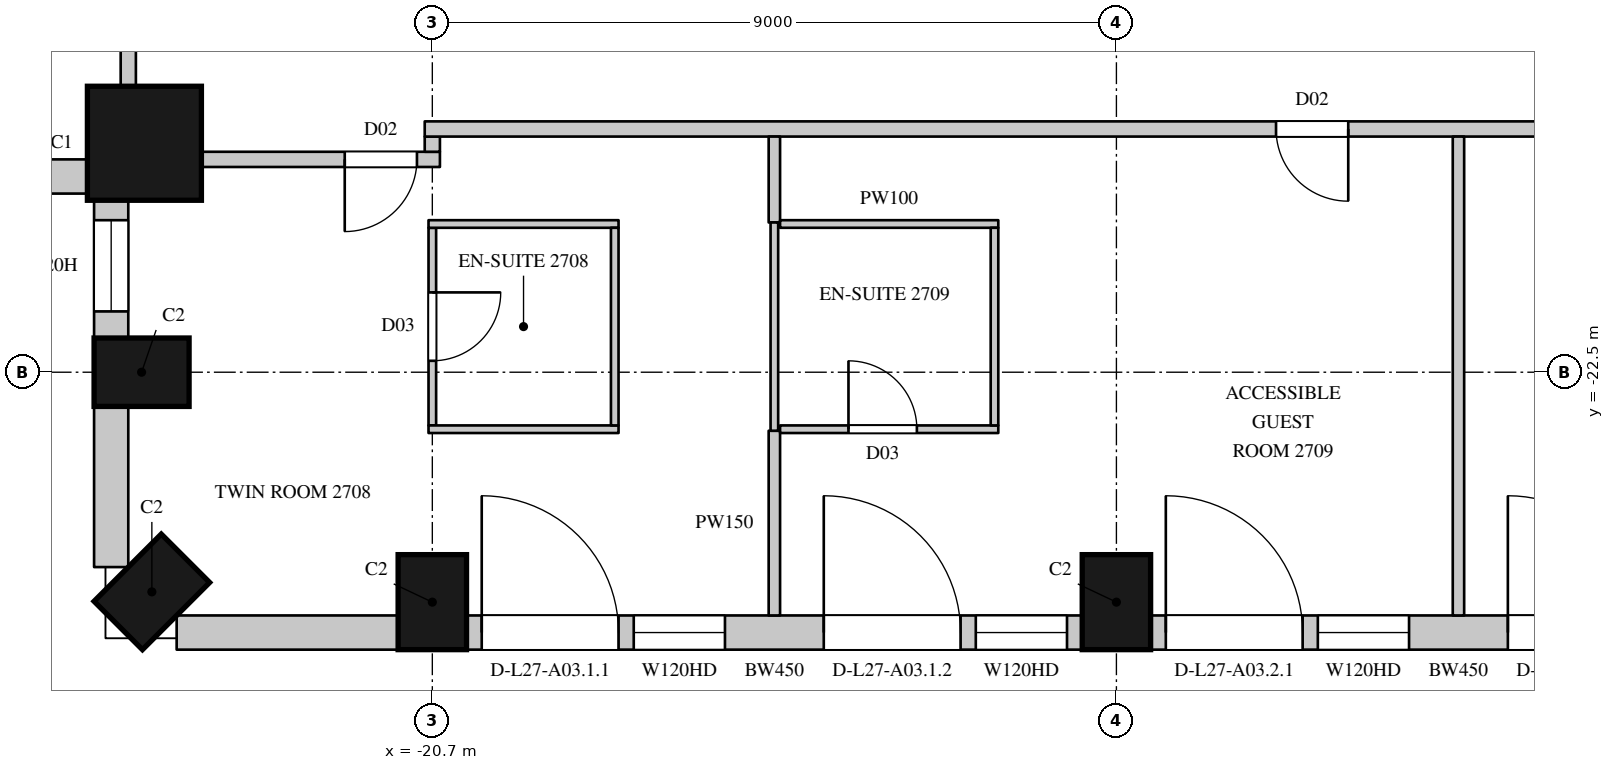
"""IFC4 building model, lengths in metres.
Left out: names, types, materials, properties, quantities, classifications, styles, units other than length and angle.
Written with IfcOpenShell. Run it as: python <this file> out.ifc"""

import sys

from ifc_helpers import new_model, si_unit, direction, frame, frame_2d, origin, origin_2d, place, context, subcontext, project, spatial, rectangle, circle, extrude, element, fill, save


model = new_model("IFC4")
c1 = context("Model", 3, precision=1e-05, world=origin(), true_north=direction((0.0, 1.0)))
c2 = subcontext(c1, "Body", "Model", "MODEL_VIEW")
j1 = project(units=[si_unit("LENGTHUNIT", "METRE"), si_unit("PLANEANGLEUNIT", "RADIAN")], contexts=[c1])
p1 = place(None, origin())
s1 = spatial("IfcSite", under=j1, at=p1, CompositionType="ELEMENT")
p2 = place(p1, origin())
s2 = spatial("IfcBuilding", under=s1, at=p2, CompositionType="ELEMENT")
p3 = place(p2, frame((0.0, 0.0, 127.5)))
s3 = spatial("IfcBuildingStorey", under=s2, at=p3, CompositionType="ELEMENT", Elevation=127.5)
p4 = place(p3, frame((-24.488, -19.488, 0.0), z_axis=(0.0, 0.0, 1.0), x_axis=(1.0, 0.0, 0.0)))
e1 = element("IfcColumn", 1, at=p4, inside=s3, PredefinedType="COLUMN", context=c2, shape_type="SweptSolid", body=[
    extrude(circle(Radius=0.75, at=origin_2d()), origin(), (0.0, 0.0, 1.0), 3.6),
])
for number, where, z_axis, x_axis in (
    (2, (-24.525, -22.5, 0.0), (0.0, 0.0, 1.0), (0.0, -1.0, 0.0)),
    (3, (-24.39, -25.39, 0.0), (0.0, 0.0, 1.0), (0.707, -0.707, 0.0)),
    (4, (-20.7, -25.525, 0.0), (0.0, 0.0, 1.0), (1.0, 0.0, 0.0)),
    (5, (-11.7, -25.525, 0.0), (0.0, 0.0, 1.0), (1.0, 0.0, 0.0)),
):
    element("IfcColumn", number, at=place(p3, frame(where, z_axis=z_axis, x_axis=x_axis)), inside=s3, PredefinedType="COLUMN", context=c2, shape_type="SweptSolid", body=[
        extrude(rectangle(XDim=0.9, YDim=1.25, at=origin_2d()), origin(), (0.0, 0.0, 1.0), 3.6),
    ])
p5 = place(p3, frame((-29.064, -19.925, 0.0), z_axis=(0.0, 0.0, 1.0), x_axis=(1.0, 0.0, 0.0)))
e6 = element("IfcWall", 6, at=p5, inside=s3, PredefinedType="SOLIDWALL", context=c2, shape_type="SweptSolid", body=[
    extrude(rectangle(XDim=3.857, YDim=0.45, at=frame_2d((1.928, 0.0))), origin(), (0.0, 0.0, 1.0), 3.3),
])
p6 = place(p5, frame((0.514, 0.0, 1.05)))
e7 = element("IfcOpeningElement", 7, at=p6, cuts=e6, PredefinedType="OPENING", context=c2, shape_type="SweptSolid", body=[
    extrude(rectangle(XDim=2.7, YDim=2.0, at=frame_2d((1.35, 1.0))), frame((0.0, 0.235, 0.0), z_axis=(0.0, -1.0, 0.0), x_axis=(1.0, 0.0, 0.0)), (0.0, 0.0, 1.0), 0.47),
])
p7 = place(p3, frame((-24.925, -20.207, 0.0), z_axis=(0.0, 0.0, 1.0), x_axis=(0.0, -1.0, 0.0)))
e8 = element("IfcWall", 8, at=p7, inside=s3, PredefinedType="SOLIDWALL", context=c2, shape_type="SweptSolid", body=[
    extrude(rectangle(XDim=1.843, YDim=0.45, at=frame_2d((0.921, 0.0))), origin(), (0.0, 0.0, 1.0), 3.3),
])
p8 = place(p7, frame((0.293, 0.0, 1.05)))
e9 = element("IfcOpeningElement", 9, at=p8, cuts=e8, PredefinedType="OPENING", context=c2, shape_type="SweptSolid", body=[
    extrude(rectangle(XDim=1.2, YDim=2.0, at=frame_2d((0.6, 1.0))), frame((0.0, 0.235, 0.0), z_axis=(0.0, -1.0, 0.0), x_axis=(1.0, 0.0, 0.0)), (0.0, 0.0, 1.0), 0.47),
])
p9 = place(p3, frame((-24.925, -22.95, 0.0), z_axis=(0.0, 0.0, 1.0), x_axis=(0.0, -1.0, 0.0)))
e10 = element("IfcWall", 10, at=p9, inside=s3, PredefinedType="SOLIDWALL", context=c2, shape_type="SweptSolid", body=[
    extrude(rectangle(XDim=2.114, YDim=0.45, at=frame_2d((1.057, 0.0))), origin(), (0.0, 0.0, 1.0), 3.3),
])
p10 = place(p3, frame((-24.064, -25.925, 0.0), z_axis=(0.0, 0.0, 1.0), x_axis=(1.0, 0.0, 0.0)))
e11 = element("IfcWall", 11, at=p10, inside=s3, PredefinedType="SOLIDWALL", context=c2, shape_type="SweptSolid", body=[
    extrude(rectangle(XDim=2.914, YDim=0.45, at=frame_2d((1.457, 0.0))), origin(), (0.0, 0.0, 1.0), 3.3),
])
p11 = place(p3, frame((-20.25, -25.925, 0.0), z_axis=(0.0, 0.0, 1.0), x_axis=(1.0, 0.0, 0.0)))
e12 = element("IfcWall", 12, at=p11, inside=s3, PredefinedType="SOLIDWALL", context=c2, shape_type="SweptSolid", body=[
    extrude(rectangle(XDim=8.1, YDim=0.45, at=frame_2d((4.05, 0.0))), origin(), (0.0, 0.0, 1.0), 3.3),
])
p12 = place(p11, frame((0.2, 0.0, 0.0)))
e13 = element("IfcOpeningElement", 13, at=p12, cuts=e12, PredefinedType="OPENING", context=c2, shape_type="SweptSolid", body=[
    extrude(rectangle(XDim=1.8, YDim=2.4, at=frame_2d((0.9, 1.2))), frame((0.0, 0.235, 0.0), z_axis=(0.0, -1.0, 0.0), x_axis=(1.0, 0.0, 0.0)), (0.0, 0.0, 1.0), 0.47),
])
p13 = place(p11, frame((2.2, 0.0, 1.05)))
e14 = element("IfcOpeningElement", 14, at=p13, cuts=e12, PredefinedType="OPENING", context=c2, shape_type="SweptSolid", body=[
    extrude(rectangle(XDim=1.2, YDim=2.0, at=frame_2d((0.6, 1.0))), frame((0.0, 0.235, 0.0), z_axis=(0.0, -1.0, 0.0), x_axis=(1.0, 0.0, 0.0)), (0.0, 0.0, 1.0), 0.47),
])
p14 = place(p11, frame((4.7, 0.0, 0.0)))
e15 = element("IfcOpeningElement", 15, at=p14, cuts=e12, PredefinedType="OPENING", context=c2, shape_type="SweptSolid", body=[
    extrude(rectangle(XDim=1.8, YDim=2.4, at=frame_2d((0.9, 1.2))), frame((0.0, 0.235, 0.0), z_axis=(0.0, -1.0, 0.0), x_axis=(1.0, 0.0, 0.0)), (0.0, 0.0, 1.0), 0.47),
])
p15 = place(p11, frame((6.7, 0.0, 1.05)))
e16 = element("IfcOpeningElement", 16, at=p15, cuts=e12, PredefinedType="OPENING", context=c2, shape_type="SweptSolid", body=[
    extrude(rectangle(XDim=1.2, YDim=2.0, at=frame_2d((0.6, 1.0))), frame((0.0, 0.235, 0.0), z_axis=(0.0, -1.0, 0.0), x_axis=(1.0, 0.0, 0.0)), (0.0, 0.0, 1.0), 0.47),
])
p16 = place(p3, frame((-11.25, -25.925, 0.0), z_axis=(0.0, 0.0, 1.0), x_axis=(1.0, 0.0, 0.0)))
e17 = element("IfcWall", 17, at=p16, inside=s3, PredefinedType="SOLIDWALL", context=c2, shape_type="SweptSolid", body=[
    extrude(rectangle(XDim=8.1, YDim=0.45, at=frame_2d((4.05, 0.0))), origin(), (0.0, 0.0, 1.0), 3.3),
])
p17 = place(p16, frame((0.2, 0.0, 0.0)))
e18 = element("IfcOpeningElement", 18, at=p17, cuts=e17, PredefinedType="OPENING", context=c2, shape_type="SweptSolid", body=[
    extrude(rectangle(XDim=1.8, YDim=2.4, at=frame_2d((0.9, 1.2))), frame((0.0, 0.235, 0.0), z_axis=(0.0, -1.0, 0.0), x_axis=(1.0, 0.0, 0.0)), (0.0, 0.0, 1.0), 0.47),
])
p18 = place(p16, frame((2.2, 0.0, 1.05)))
e19 = element("IfcOpeningElement", 19, at=p18, cuts=e17, PredefinedType="OPENING", context=c2, shape_type="SweptSolid", body=[
    extrude(rectangle(XDim=1.2, YDim=2.0, at=frame_2d((0.6, 1.0))), frame((0.0, 0.235, 0.0), z_axis=(0.0, -1.0, 0.0), x_axis=(1.0, 0.0, 0.0)), (0.0, 0.0, 1.0), 0.47),
])
p19 = place(p16, frame((4.7, 0.0, 0.0)))
e20 = element("IfcOpeningElement", 20, at=p19, cuts=e17, PredefinedType="OPENING", context=c2, shape_type="SweptSolid", body=[
    extrude(rectangle(XDim=1.8, YDim=2.4, at=frame_2d((0.9, 1.2))), frame((0.0, 0.235, 0.0), z_axis=(0.0, -1.0, 0.0), x_axis=(1.0, 0.0, 0.0)), (0.0, 0.0, 1.0), 0.47),
])
p20 = place(p16, frame((6.7, 0.0, 1.05)))
e21 = element("IfcOpeningElement", 21, at=p20, cuts=e17, PredefinedType="OPENING", context=c2, shape_type="SweptSolid", body=[
    extrude(rectangle(XDim=1.2, YDim=2.0, at=frame_2d((0.6, 1.0))), frame((0.0, 0.235, 0.0), z_axis=(0.0, -1.0, 0.0), x_axis=(1.0, 0.0, 0.0)), (0.0, 0.0, 1.0), 0.47),
])
p21 = place(p3, frame((-24.7, -18.752, 0.0), z_axis=(0.0, 0.0, 1.0), x_axis=(0.0, 1.0, 0.0)))
e22 = element("IfcWall", 22, at=p21, inside=s3, PredefinedType="PARTITIONING", context=c2, shape_type="SweptSolid", body=[
    extrude(rectangle(XDim=2.722, YDim=0.2, at=frame_2d((1.361, 0.0))), origin(), (0.0, 0.0, 1.0), 3.3),
])
p22 = place(p21, frame((0.65, 0.0, 0.0)))
e23 = element("IfcOpeningElement", 23, at=p22, cuts=e22, PredefinedType="OPENING", context=c2, shape_type="SweptSolid", body=[
    extrude(rectangle(XDim=1.6, YDim=2.4, at=frame_2d((0.8, 1.2))), frame((0.0, 0.11, 0.0), z_axis=(0.0, -1.0, 0.0), x_axis=(1.0, 0.0, 0.0)), (0.0, 0.0, 1.0), 0.22),
])
p23 = place(p3, frame((-23.752, -19.7, 0.0), z_axis=(0.0, 0.0, 1.0), x_axis=(1.0, 0.0, 0.0)))
e24 = element("IfcWall", 24, at=p23, inside=s3, PredefinedType="PARTITIONING", context=c2, shape_type="SweptSolid", body=[
    extrude(rectangle(XDim=3.152, YDim=0.2, at=frame_2d((1.576, 0.0))), origin(), (0.0, 0.0, 1.0), 3.3),
])
p24 = place(p23, frame((1.9, 0.0, 0.0)))
e25 = element("IfcOpeningElement", 25, at=p24, cuts=e24, PredefinedType="OPENING", context=c2, shape_type="SweptSolid", body=[
    extrude(rectangle(XDim=0.95, YDim=2.2, at=frame_2d((0.475, 1.1))), frame((0.0, 0.11, 0.0), z_axis=(0.0, -1.0, 0.0), x_axis=(1.0, 0.0, 0.0)), (0.0, 0.0, 1.0), 0.22),
])
p25 = place(p3, frame((-20.7, -19.6, 0.0), z_axis=(0.0, 0.0, 1.0), x_axis=(0.0, 1.0, 0.0)))
e26 = element("IfcWall", 26, at=p25, inside=s3, PredefinedType="PARTITIONING", context=c2, shape_type="SweptSolid", body=[
    extrude(rectangle(XDim=0.2, YDim=0.2, at=frame_2d((0.1, 0.0))), origin(), (0.0, 0.0, 1.0), 3.3),
])
p26 = place(p3, frame((-20.8, -19.3, 0.0), z_axis=(0.0, 0.0, 1.0), x_axis=(1.0, 0.0, 0.0)))
e27 = element("IfcWall", 27, at=p26, inside=s3, PredefinedType="PARTITIONING", context=c2, shape_type="SweptSolid", body=[
    extrude(rectangle(XDim=38.6, YDim=0.2, at=frame_2d((19.3, 0.0))), origin(), (0.0, 0.0, 1.0), 3.3),
])
p27 = place(p26, frame((11.2, 0.0, 0.0)))
e28 = element("IfcOpeningElement", 28, at=p27, cuts=e27, PredefinedType="OPENING", context=c2, shape_type="SweptSolid", body=[
    extrude(rectangle(XDim=0.95, YDim=2.2, at=frame_2d((0.475, 1.1))), frame((0.0, 0.11, 0.0), z_axis=(0.0, -1.0, 0.0), x_axis=(1.0, 0.0, 0.0)), (0.0, 0.0, 1.0), 0.22),
])
p28 = place(p26, frame((15.05, 0.0, 0.0)))
e29 = element("IfcOpeningElement", 29, at=p28, cuts=e27, PredefinedType="OPENING", context=c2, shape_type="SweptSolid", body=[
    extrude(rectangle(XDim=0.95, YDim=2.2, at=frame_2d((0.475, 1.1))), frame((0.0, 0.11, 0.0), z_axis=(0.0, -1.0, 0.0), x_axis=(1.0, 0.0, 0.0)), (0.0, 0.0, 1.0), 0.22),
])
p29 = place(p26, frame((29.2, 0.0, 0.0)))
e30 = element("IfcOpeningElement", 30, at=p29, cuts=e27, PredefinedType="OPENING", context=c2, shape_type="SweptSolid", body=[
    extrude(rectangle(XDim=0.95, YDim=2.2, at=frame_2d((0.475, 1.1))), frame((0.0, 0.11, 0.0), z_axis=(0.0, -1.0, 0.0), x_axis=(1.0, 0.0, 0.0)), (0.0, 0.0, 1.0), 0.22),
])
p30 = place(p26, frame((33.05, 0.0, 0.0)))
e31 = element("IfcOpeningElement", 31, at=p30, cuts=e27, PredefinedType="OPENING", context=c2, shape_type="SweptSolid", body=[
    extrude(rectangle(XDim=0.95, YDim=2.2, at=frame_2d((0.475, 1.1))), frame((0.0, 0.11, 0.0), z_axis=(0.0, -1.0, 0.0), x_axis=(1.0, 0.0, 0.0)), (0.0, 0.0, 1.0), 0.22),
])
p31 = place(p3, frame((-16.2, -25.7, 0.0), z_axis=(0.0, 0.0, 1.0), x_axis=(0.0, 1.0, 0.0)))
e32 = element("IfcWall", 32, at=p31, inside=s3, PredefinedType="PARTITIONING", context=c2, shape_type="SweptSolid", body=[
    extrude(rectangle(XDim=2.43, YDim=0.15, at=frame_2d((1.215, 0.0))), origin(), (0.0, 0.0, 1.0), 2.65),
])
p32 = place(p3, frame((-16.2, -20.53, 0.0), z_axis=(0.0, 0.0, 1.0), x_axis=(0.0, 1.0, 0.0)))
e33 = element("IfcWall", 33, at=p32, inside=s3, PredefinedType="PARTITIONING", context=c2, shape_type="SweptSolid", body=[
    extrude(rectangle(XDim=1.13, YDim=0.15, at=frame_2d((0.565, 0.0))), origin(), (0.0, 0.0, 1.0), 2.65),
])
p33 = place(p3, frame((-7.2, -25.7, 0.0), z_axis=(0.0, 0.0, 1.0), x_axis=(0.0, 1.0, 0.0)))
e34 = element("IfcWall", 34, at=p33, inside=s3, PredefinedType="PARTITIONING", context=c2, shape_type="SweptSolid", body=[
    extrude(rectangle(XDim=6.3, YDim=0.15, at=frame_2d((3.15, 0.0))), origin(), (0.0, 0.0, 1.0), 2.65),
])
p34 = place(p3, frame((-20.7, -23.2, 0.0), z_axis=(0.0, 0.0, 1.0), x_axis=(0.0, 1.0, 0.0)))
e35 = element("IfcWall", 35, at=p34, inside=s3, PredefinedType="PARTITIONING", context=c2, shape_type="SweptSolid", body=[
    extrude(rectangle(XDim=2.6, YDim=0.1, at=frame_2d((1.3, 0.0))), origin(), (0.0, 0.0, 1.0), 2.75),
])
p35 = place(p34, frame((0.85, 0.0, 0.0)))
e36 = element("IfcOpeningElement", 36, at=p35, cuts=e35, PredefinedType="OPENING", context=c2, shape_type="SweptSolid", body=[
    extrude(rectangle(XDim=0.9, YDim=2.2, at=frame_2d((0.45, 1.1))), frame((0.0, 0.06, 0.0), z_axis=(0.0, -1.0, 0.0), x_axis=(1.0, 0.0, 0.0)), (0.0, 0.0, 1.0), 0.12),
])
for number, where, z_axis, x_axis in (
    (37, (-20.75, -23.25, 0.0), (0.0, 0.0, 1.0), (1.0, 0.0, 0.0)),
    (38, (-20.75, -20.55, 0.0), (0.0, 0.0, 1.0), (1.0, 0.0, 0.0)),
):
    element("IfcWall", number, at=place(p3, frame(where, z_axis=z_axis, x_axis=x_axis)), inside=s3, PredefinedType="PARTITIONING", context=c2, shape_type="SweptSolid", body=[
        extrude(rectangle(XDim=2.5, YDim=0.1, at=frame_2d((1.25, 0.0))), origin(), (0.0, 0.0, 1.0), 3.3),
    ])
p36 = place(p3, frame((-18.3, -23.2, 0.0), z_axis=(0.0, 0.0, 1.0), x_axis=(0.0, 1.0, 0.0)))
e39 = element("IfcWall", 39, at=p36, inside=s3, PredefinedType="PARTITIONING", context=c2, shape_type="SweptSolid", body=[
    extrude(rectangle(XDim=2.6, YDim=0.1, at=frame_2d((1.3, 0.0))), origin(), (0.0, 0.0, 1.0), 3.3),
])
p37 = place(p3, frame((-16.2, -23.27, 0.0), z_axis=(0.0, 0.0, 1.0), x_axis=(0.0, 1.0, 0.0)))
e40 = element("IfcWall", 40, at=p37, inside=s3, PredefinedType="PARTITIONING", context=c2, shape_type="SweptSolid", body=[
    extrude(rectangle(XDim=2.74, YDim=0.1, at=frame_2d((1.37, 0.0))), origin(), (0.0, 0.0, 1.0), 2.65),
])
p38 = place(p3, frame((-16.125, -23.25, 0.0), z_axis=(0.0, 0.0, 1.0), x_axis=(1.0, 0.0, 0.0)))
e41 = element("IfcWall", 41, at=p38, inside=s3, PredefinedType="PARTITIONING", context=c2, shape_type="SweptSolid", body=[
    extrude(rectangle(XDim=2.871, YDim=0.1, at=frame_2d((1.436, 0.0))), origin(), (0.0, 0.0, 1.0), 3.3),
])
p39 = place(p38, frame((0.9, 0.0, 0.0)))
e42 = element("IfcOpeningElement", 42, at=p39, cuts=e41, PredefinedType="OPENING", context=c2, shape_type="SweptSolid", body=[
    extrude(rectangle(XDim=0.9, YDim=2.2, at=frame_2d((0.45, 1.1))), frame((0.0, 0.06, 0.0), z_axis=(0.0, -1.0, 0.0), x_axis=(1.0, 0.0, 0.0)), (0.0, 0.0, 1.0), 0.12),
])
p40 = place(p3, frame((-16.125, -20.55, 0.0), z_axis=(0.0, 0.0, 1.0), x_axis=(1.0, 0.0, 0.0)))
e43 = element("IfcWall", 43, at=p40, inside=s3, PredefinedType="PARTITIONING", context=c2, shape_type="SweptSolid", body=[
    extrude(rectangle(XDim=2.871, YDim=0.1, at=frame_2d((1.436, 0.0))), origin(), (0.0, 0.0, 1.0), 3.3),
])
p41 = place(p3, frame((-13.304, -23.2, 0.0), z_axis=(0.0, 0.0, 1.0), x_axis=(0.0, 1.0, 0.0)))
e44 = element("IfcWall", 44, at=p41, inside=s3, PredefinedType="PARTITIONING", context=c2, shape_type="SweptSolid", body=[
    extrude(rectangle(XDim=2.6, YDim=0.1, at=frame_2d((1.3, 0.0))), origin(), (0.0, 0.0, 1.0), 3.3),
])
p42 = place(p8, origin())
e45 = element("IfcWindow", 45, at=p42, inside=s3, PartitioningType="SINGLE_PANEL", PredefinedType="WINDOW", context=c2, shape_type="SweptSolid", body=[
    extrude(rectangle(XDim=1.2, YDim=2.0, at=frame_2d((0.6, 1.0))), frame((0.0, 0.135, 0.0), z_axis=(0.0, -1.0, 0.0), x_axis=(1.0, 0.0, 0.0)), (0.0, 0.0, 1.0), 0.06),
])
fill(e9, e45)
p43 = place(p12, origin())
e46 = element("IfcDoor", 46, at=p43, inside=s3, OperationType="SLIDING_TO_LEFT", PredefinedType="DOOR", context=c2, shape_type="SweptSolid", body=[
    extrude(rectangle(XDim=1.8, YDim=2.4, at=frame_2d((0.9, 1.2))), frame((0.0, 0.13, 0.0), z_axis=(0.0, -1.0, 0.0), x_axis=(1.0, 0.0, 0.0)), (0.0, 0.0, 1.0), 0.05),
])
fill(e13, e46)
p44 = place(p13, origin())
e47 = element("IfcWindow", 47, at=p44, inside=s3, PartitioningType="SINGLE_PANEL", PredefinedType="WINDOW", context=c2, shape_type="SweptSolid", body=[
    extrude(rectangle(XDim=1.2, YDim=2.0, at=frame_2d((0.6, 1.0))), frame((0.0, 0.135, 0.0), z_axis=(0.0, -1.0, 0.0), x_axis=(1.0, 0.0, 0.0)), (0.0, 0.0, 1.0), 0.06),
])
fill(e14, e47)
p45 = place(p14, origin())
e48 = element("IfcDoor", 48, at=p45, inside=s3, OperationType="SLIDING_TO_LEFT", PredefinedType="DOOR", context=c2, shape_type="SweptSolid", body=[
    extrude(rectangle(XDim=1.8, YDim=2.4, at=frame_2d((0.9, 1.2))), frame((0.0, 0.13, 0.0), z_axis=(0.0, -1.0, 0.0), x_axis=(1.0, 0.0, 0.0)), (0.0, 0.0, 1.0), 0.05),
])
fill(e15, e48)
p46 = place(p15, origin())
e49 = element("IfcWindow", 49, at=p46, inside=s3, PartitioningType="SINGLE_PANEL", PredefinedType="WINDOW", context=c2, shape_type="SweptSolid", body=[
    extrude(rectangle(XDim=1.2, YDim=2.0, at=frame_2d((0.6, 1.0))), frame((0.0, 0.135, 0.0), z_axis=(0.0, -1.0, 0.0), x_axis=(1.0, 0.0, 0.0)), (0.0, 0.0, 1.0), 0.06),
])
fill(e16, e49)
p47 = place(p17, origin())
e50 = element("IfcDoor", 50, at=p47, inside=s3, OperationType="SLIDING_TO_LEFT", PredefinedType="DOOR", context=c2, shape_type="SweptSolid", body=[
    extrude(rectangle(XDim=1.8, YDim=2.4, at=frame_2d((0.9, 1.2))), frame((0.0, 0.13, 0.0), z_axis=(0.0, -1.0, 0.0), x_axis=(1.0, 0.0, 0.0)), (0.0, 0.0, 1.0), 0.05),
])
fill(e18, e50)
p48 = place(p18, origin())
e51 = element("IfcWindow", 51, at=p48, inside=s3, PartitioningType="SINGLE_PANEL", PredefinedType="WINDOW", context=c2, shape_type="SweptSolid", body=[
    extrude(rectangle(XDim=1.2, YDim=2.0, at=frame_2d((0.6, 1.0))), frame((0.0, 0.135, 0.0), z_axis=(0.0, -1.0, 0.0), x_axis=(1.0, 0.0, 0.0)), (0.0, 0.0, 1.0), 0.06),
])
fill(e19, e51)
p49 = place(p19, origin())
e52 = element("IfcDoor", 52, at=p49, inside=s3, OperationType="SLIDING_TO_LEFT", PredefinedType="DOOR", context=c2, shape_type="SweptSolid", body=[
    extrude(rectangle(XDim=1.8, YDim=2.4, at=frame_2d((0.9, 1.2))), frame((0.0, 0.13, 0.0), z_axis=(0.0, -1.0, 0.0), x_axis=(1.0, 0.0, 0.0)), (0.0, 0.0, 1.0), 0.05),
])
fill(e20, e52)
p50 = place(p24, origin())
e53 = element("IfcDoor", 53, at=p50, inside=s3, OperationType="SINGLE_SWING_RIGHT", PredefinedType="DOOR", context=c2, shape_type="SweptSolid", body=[
    extrude(rectangle(XDim=0.95, YDim=2.2, at=frame_2d((0.475, 1.1))), frame((0.0, 0.025, 0.0), z_axis=(0.0, -1.0, 0.0), x_axis=(1.0, 0.0, 0.0)), (0.0, 0.0, 1.0), 0.05),
])
fill(e25, e53)
p51 = place(p35, origin())
e54 = element("IfcDoor", 54, at=p51, inside=s3, OperationType="SINGLE_SWING_LEFT", PredefinedType="DOOR", context=c2, shape_type="SweptSolid", body=[
    extrude(rectangle(XDim=0.9, YDim=2.2, at=frame_2d((0.45, 1.1))), frame((0.0, 0.025, 0.0), z_axis=(0.0, -1.0, 0.0), x_axis=(1.0, 0.0, 0.0)), (0.0, 0.0, 1.0), 0.05),
])
fill(e36, e54)
p52 = place(p27, origin())
e55 = element("IfcDoor", 55, at=p52, inside=s3, OperationType="SINGLE_SWING_LEFT", PredefinedType="DOOR", context=c2, shape_type="SweptSolid", body=[
    extrude(rectangle(XDim=0.95, YDim=2.2, at=frame_2d((0.475, 1.1))), frame((0.0, 0.025, 0.0), z_axis=(0.0, -1.0, 0.0), x_axis=(1.0, 0.0, 0.0)), (0.0, 0.0, 1.0), 0.05),
])
fill(e28, e55)
p53 = place(p39, origin())
e56 = element("IfcDoor", 56, at=p53, inside=s3, OperationType="SINGLE_SWING_LEFT", PredefinedType="DOOR", context=c2, shape_type="SweptSolid", body=[
    extrude(rectangle(XDim=0.9, YDim=2.2, at=frame_2d((0.45, 1.1))), frame((0.0, 0.025, 0.0), z_axis=(0.0, -1.0, 0.0), x_axis=(1.0, 0.0, 0.0)), (0.0, 0.0, 1.0), 0.05),
])
fill(e42, e56)
save(model, sys.argv[1])
